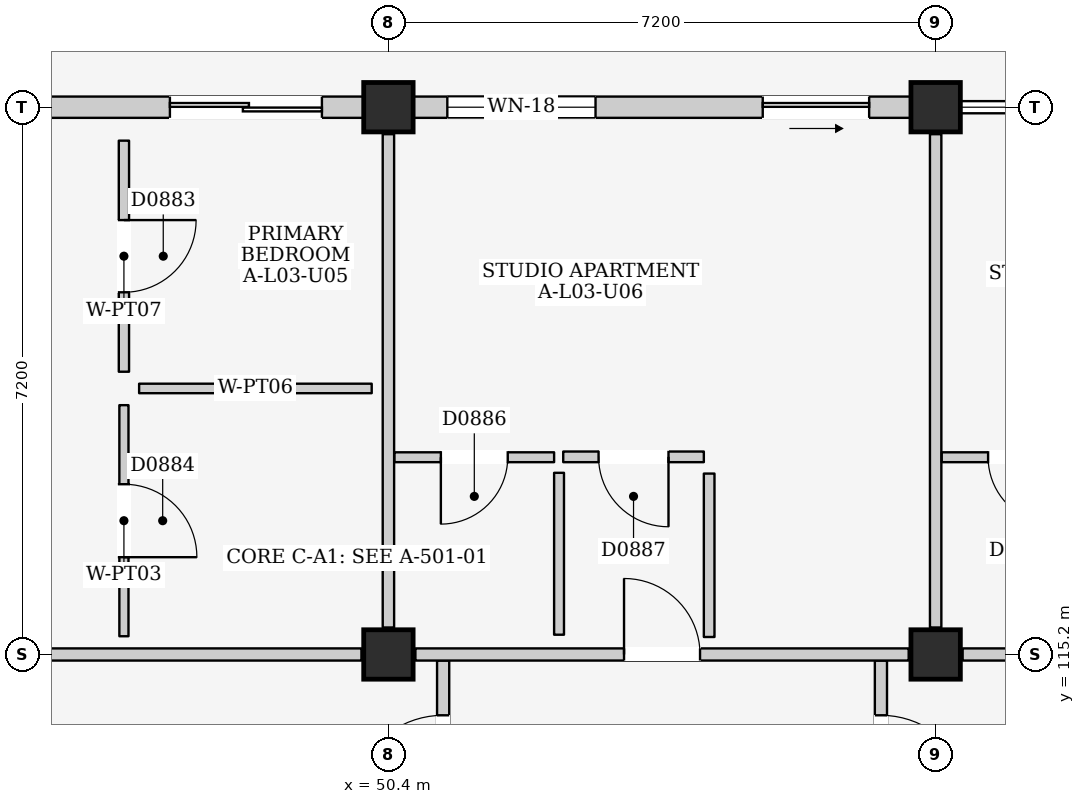
"""IFC4 building model, lengths in metres.
Left out: names, types, materials, properties, quantities, classifications, styles, units other than length and angle.
Written with IfcOpenShell. Run it as: python <this file> out.ifc"""

import sys

from ifc_helpers import new_model, si_unit, direction, frame, frame_2d, origin, origin_2d, place, context, subcontext, project, spatial, rectangle, extrude, element, fill, save


model = new_model("IFC4")
c1 = context("Model", 3, precision=1e-05, world=origin(), true_north=direction((0.0, 1.0)))
c2 = subcontext(c1, "Body", "Model", "MODEL_VIEW")
j1 = project(units=[si_unit("LENGTHUNIT", "METRE"), si_unit("PLANEANGLEUNIT", "RADIAN")], contexts=[c1])
p1 = place(None, origin())
s1 = spatial("IfcSite", under=j1, at=p1, CompositionType="ELEMENT")
p2 = place(p1, origin())
s2 = spatial("IfcBuilding", under=s1, at=p2, CompositionType="ELEMENT")
p3 = place(p2, frame((0.0, 0.0, 12.2)))
s3 = spatial("IfcBuildingStorey", under=s2, at=p3, CompositionType="ELEMENT", Elevation=12.2)
for number, where, z_axis, x_axis in (
    (1, (50.4, 115.2, 0.0), (0.0, 0.0, 1.0), (1.0, 0.0, 0.0)),
    (2, (50.4, 122.4, 0.0), (0.0, 0.0, 1.0), (1.0, 0.0, 0.0)),
    (3, (57.6, 115.2, 0.0), (0.0, 0.0, 1.0), (1.0, 0.0, 0.0)),
    (4, (57.6, 122.4, 0.0), (0.0, 0.0, 1.0), (1.0, 0.0, 0.0)),
):
    element("IfcColumn", number, at=place(p3, frame(where, z_axis=z_axis, x_axis=x_axis)), inside=s3, PredefinedType="COLUMN", context=c2, shape_type="SweptSolid", body=[
        extrude(rectangle(XDim=0.65, YDim=0.65, at=origin_2d()), origin(), (0.0, 0.0, 1.0), 3.2),
    ])
p4 = place(p3, frame((43.525, 122.4, 0.0), z_axis=(0.0, 0.0, 1.0), x_axis=(1.0, 0.0, 0.0)))
e5 = element("IfcWall", 5, at=p4, inside=s3, PredefinedType="ELEMENTEDWALL", context=c2, shape_type="SweptSolid", body=[
    extrude(rectangle(XDim=6.55, YDim=0.28, at=frame_2d((3.275, 0.0))), origin(), (0.0, 0.0, 1.0), 2.445),
])
p5 = place(p4, frame((4.0, 0.0, 0.0)))
e6 = element("IfcOpeningElement", 6, at=p5, cuts=e5, PredefinedType="OPENING", context=c2, shape_type="SweptSolid", body=[
    extrude(rectangle(XDim=2.0, YDim=2.12, at=frame_2d((1.0, 1.06))), frame((0.0, 0.155, 0.0), z_axis=(0.0, -1.0, 0.0), x_axis=(1.0, 0.0, 0.0)), (0.0, 0.0, 1.0), 0.31),
])
p6 = place(p4, frame((0.45, 0.0, 0.9)))
e7 = element("IfcOpeningElement", 7, at=p6, cuts=e5, PredefinedType="OPENING", context=c2, shape_type="SweptSolid", body=[
    extrude(rectangle(XDim=1.25, YDim=1.3, at=frame_2d((0.625, 0.65))), frame((0.0, 0.155, 0.0), z_axis=(0.0, -1.0, 0.0), x_axis=(1.0, 0.0, 0.0)), (0.0, 0.0, 1.0), 0.31),
])
p7 = place(p3, frame((50.725, 122.4, 0.0), z_axis=(0.0, 0.0, 1.0), x_axis=(1.0, 0.0, 0.0)))
e8 = element("IfcWall", 8, at=p7, inside=s3, PredefinedType="ELEMENTEDWALL", context=c2, shape_type="SweptSolid", body=[
    extrude(rectangle(XDim=6.55, YDim=0.28, at=frame_2d((3.275, 0.0))), origin(), (0.0, 0.0, 1.0), 2.445),
])
p8 = place(p7, frame((4.6, 0.0, 0.0)))
e9 = element("IfcOpeningElement", 9, at=p8, cuts=e8, PredefinedType="OPENING", context=c2, shape_type="SweptSolid", body=[
    extrude(rectangle(XDim=1.4, YDim=2.1, at=frame_2d((0.7, 1.05))), frame((0.0, 0.155, 0.0), z_axis=(0.0, -1.0, 0.0), x_axis=(1.0, 0.0, 0.0)), (0.0, 0.0, 1.0), 0.31),
])
p9 = place(p7, frame((0.45, 0.0, 0.785)))
e10 = element("IfcOpeningElement", 10, at=p9, cuts=e8, PredefinedType="OPENING", context=c2, shape_type="SweptSolid", body=[
    extrude(rectangle(XDim=1.95, YDim=1.55, at=frame_2d((0.975, 0.775))), frame((0.0, 0.155, 0.0), z_axis=(0.0, -1.0, 0.0), x_axis=(1.0, 0.0, 0.0)), (0.0, 0.0, 1.0), 0.31),
])
p10 = place(p3, frame((51.12, 111.1, 0.0), z_axis=(0.0, 0.0, 1.0), x_axis=(0.0, 1.0, 0.0)))
e11 = element("IfcWall", 11, at=p10, inside=s3, PredefinedType="PARTITIONING", context=c2, shape_type="SweptSolid", body=[
    extrude(rectangle(XDim=4.02, YDim=0.16, at=frame_2d((2.01, 0.0))), origin(), (0.0, 0.0, 1.0), 2.98),
])
p11 = place(p10, frame((2.1, 0.0, 0.0)))
e12 = element("IfcOpeningElement", 12, at=p11, cuts=e11, PredefinedType="OPENING", context=c2, shape_type="SweptSolid", body=[
    extrude(rectangle(XDim=1.2, YDim=2.2, at=frame_2d((0.6, 1.1))), frame((0.0, 0.095, 0.0), z_axis=(0.0, -1.0, 0.0), x_axis=(1.0, 0.0, 0.0)), (0.0, 0.0, 1.0), 0.19),
])
p12 = place(p3, frame((56.88, 111.1, 0.0), z_axis=(0.0, 0.0, 1.0), x_axis=(0.0, 1.0, 0.0)))
e13 = element("IfcWall", 13, at=p12, inside=s3, PredefinedType="PARTITIONING", context=c2, shape_type="SweptSolid", body=[
    extrude(rectangle(XDim=4.02, YDim=0.16, at=frame_2d((2.01, 0.0))), origin(), (0.0, 0.0, 1.0), 2.98),
])
p13 = place(p12, frame((2.1, 0.0, 0.0)))
e14 = element("IfcOpeningElement", 14, at=p13, cuts=e13, PredefinedType="OPENING", context=c2, shape_type="SweptSolid", body=[
    extrude(rectangle(XDim=1.2, YDim=2.2, at=frame_2d((0.6, 1.1))), frame((0.0, 0.095, 0.0), z_axis=(0.0, -1.0, 0.0), x_axis=(1.0, 0.0, 0.0)), (0.0, 0.0, 1.0), 0.19),
])
p14 = place(p3, frame((43.555, 115.2, 0.0), z_axis=(0.0, 0.0, 1.0), x_axis=(1.0, 0.0, 0.0)))
e15 = element("IfcWall", 15, at=p14, inside=s3, PredefinedType="PARTITIONING", context=c2, shape_type="SweptSolid", body=[
    extrude(rectangle(XDim=6.49, YDim=0.16, at=frame_2d((3.245, 0.0))), origin(), (0.0, 0.0, 1.0), 2.315),
])
p15 = place(p3, frame((50.4, 115.555, 0.0), z_axis=(0.0, 0.0, 1.0), x_axis=(0.0, 1.0, 0.0)))
e16 = element("IfcWall", 16, at=p15, inside=s3, PredefinedType="PARTITIONING", context=c2, shape_type="SweptSolid", body=[
    extrude(rectangle(XDim=6.49, YDim=0.15, at=frame_2d((3.245, 0.0))), origin(), (0.0, 0.0, 1.0), 2.415),
])
p16 = place(p3, frame((46.92, 118.92, 0.0), z_axis=(0.0, 0.0, 1.0), x_axis=(0.0, 1.0, 0.0)))
e17 = element("IfcWall", 17, at=p16, inside=s3, PredefinedType="PARTITIONING", context=c2, shape_type="SweptSolid", body=[
    extrude(rectangle(XDim=3.04, YDim=0.135, at=frame_2d((1.52, 0.0))), origin(), (0.0, 0.0, 1.0), 2.98),
])
p17 = place(p16, frame((1.045, 0.0, 0.0)))
e18 = element("IfcOpeningElement", 18, at=p17, cuts=e17, PredefinedType="OPENING", context=c2, shape_type="SweptSolid", body=[
    extrude(rectangle(XDim=0.95, YDim=2.15, at=frame_2d((0.475, 1.075))), frame((0.0, 0.083, 0.0), z_axis=(0.0, -1.0, 0.0), x_axis=(1.0, 0.0, 0.0)), (0.0, 0.0, 1.0), 0.165),
])
p18 = place(p3, frame((47.12, 118.7, 0.0), z_axis=(0.0, 0.0, 1.0), x_axis=(1.0, 0.0, 0.0)))
e19 = element("IfcWall", 19, at=p18, inside=s3, PredefinedType="PARTITIONING", context=c2, shape_type="SweptSolid", body=[
    extrude(rectangle(XDim=3.06, YDim=0.125, at=frame_2d((1.53, 0.0))), origin(), (0.0, 0.0, 1.0), 2.98),
])
p19 = place(p3, frame((46.92, 115.44, 0.0), z_axis=(0.0, 0.0, 1.0), x_axis=(0.0, 1.0, 0.0)))
e20 = element("IfcWall", 20, at=p19, inside=s3, PredefinedType="PARTITIONING", context=c2, shape_type="SweptSolid", body=[
    extrude(rectangle(XDim=3.04, YDim=0.12, at=frame_2d((1.52, 0.0))), origin(), (0.0, 0.0, 1.0), 2.98),
])
p20 = place(p19, frame((1.04, 0.0, 0.0)))
e21 = element("IfcOpeningElement", 21, at=p20, cuts=e20, PredefinedType="OPENING", context=c2, shape_type="SweptSolid", body=[
    extrude(rectangle(XDim=0.96, YDim=2.15, at=frame_2d((0.48, 1.075))), frame((0.0, 0.075, 0.0), z_axis=(0.0, -1.0, 0.0), x_axis=(1.0, 0.0, 0.0)), (0.0, 0.0, 1.0), 0.15),
])
p21 = place(p3, frame((50.755, 115.2, 0.0), z_axis=(0.0, 0.0, 1.0), x_axis=(1.0, 0.0, 0.0)))
e22 = element("IfcWall", 22, at=p21, inside=s3, PredefinedType="PARTITIONING", context=c2, shape_type="SweptSolid", body=[
    extrude(rectangle(XDim=6.49, YDim=0.16, at=frame_2d((3.245, 0.0))), origin(), (0.0, 0.0, 1.0), 2.315),
])
p22 = place(p21, frame((2.745, 0.0, 0.0)))
e23 = element("IfcOpeningElement", 23, at=p22, cuts=e22, PredefinedType="OPENING", context=c2, shape_type="SweptSolid", body=[
    extrude(rectangle(XDim=1.0, YDim=2.15, at=frame_2d((0.5, 1.075))), frame((0.0, 0.095, 0.0), z_axis=(0.0, -1.0, 0.0), x_axis=(1.0, 0.0, 0.0)), (0.0, 0.0, 1.0), 0.19),
])
p23 = place(p3, frame((57.6, 115.555, 0.0), z_axis=(0.0, 0.0, 1.0), x_axis=(0.0, 1.0, 0.0)))
e24 = element("IfcWall", 24, at=p23, inside=s3, PredefinedType="PARTITIONING", context=c2, shape_type="SweptSolid", body=[
    extrude(rectangle(XDim=6.49, YDim=0.15, at=frame_2d((3.245, 0.0))), origin(), (0.0, 0.0, 1.0), 2.415),
])
p24 = place(p3, frame((50.48, 117.795, 0.0), z_axis=(0.0, 0.0, 1.0), x_axis=(1.0, 0.0, 0.0)))
e25 = element("IfcWall", 25, at=p24, inside=s3, PredefinedType="PARTITIONING", context=c2, shape_type="SweptSolid", body=[
    extrude(rectangle(XDim=2.1, YDim=0.13, at=frame_2d((1.05, 0.0))), origin(), (0.0, 0.0, 1.0), 2.98),
])
p25 = place(p24, frame((0.61, 0.0, 0.0)))
e26 = element("IfcOpeningElement", 26, at=p25, cuts=e25, PredefinedType="OPENING", context=c2, shape_type="SweptSolid", body=[
    extrude(rectangle(XDim=0.88, YDim=2.1, at=frame_2d((0.44, 1.05))), frame((0.0, 0.08, 0.0), z_axis=(0.0, -1.0, 0.0), x_axis=(1.0, 0.0, 0.0)), (0.0, 0.0, 1.0), 0.16),
])
p26 = place(p3, frame((52.645, 115.46, 0.0), z_axis=(0.0, 0.0, 1.0), x_axis=(0.0, 1.0, 0.0)))
e27 = element("IfcWall", 27, at=p26, inside=s3, PredefinedType="PARTITIONING", context=c2, shape_type="SweptSolid", body=[
    extrude(rectangle(XDim=2.13, YDim=0.13, at=frame_2d((1.065, 0.0))), origin(), (0.0, 0.0, 1.0), 2.98),
])
p27 = place(p3, frame((52.7, 117.8, 0.0), z_axis=(0.0, 0.0, 1.0), x_axis=(1.0, 0.0, 0.0)))
e28 = element("IfcWall", 28, at=p27, inside=s3, PredefinedType="PARTITIONING", context=c2, shape_type="SweptSolid", body=[
    extrude(rectangle(XDim=1.85, YDim=0.14, at=frame_2d((0.925, 0.0))), origin(), (0.0, 0.0, 1.0), 2.98),
])
p28 = place(p27, frame((0.465, 0.0, 0.0)))
e29 = element("IfcOpeningElement", 29, at=p28, cuts=e28, PredefinedType="OPENING", context=c2, shape_type="SweptSolid", body=[
    extrude(rectangle(XDim=0.92, YDim=2.1, at=frame_2d((0.46, 1.05))), frame((0.0, 0.085, 0.0), z_axis=(0.0, -1.0, 0.0), x_axis=(1.0, 0.0, 0.0)), (0.0, 0.0, 1.0), 0.17),
])
p29 = place(p3, frame((54.62, 115.43, 0.0), z_axis=(0.0, 0.0, 1.0), x_axis=(0.0, 1.0, 0.0)))
e30 = element("IfcWall", 30, at=p29, inside=s3, PredefinedType="PARTITIONING", context=c2, shape_type="SweptSolid", body=[
    extrude(rectangle(XDim=2.15, YDim=0.14, at=frame_2d((1.075, 0.0))), origin(), (0.0, 0.0, 1.0), 2.98),
])
p30 = place(p3, frame((57.955, 115.2, 0.0), z_axis=(0.0, 0.0, 1.0), x_axis=(1.0, 0.0, 0.0)))
e31 = element("IfcWall", 31, at=p30, inside=s3, PredefinedType="PARTITIONING", context=c2, shape_type="SweptSolid", body=[
    extrude(rectangle(XDim=6.49, YDim=0.16, at=frame_2d((3.245, 0.0))), origin(), (0.0, 0.0, 1.0), 2.315),
])
p31 = place(p30, frame((2.745, 0.0, 0.0)))
e32 = element("IfcOpeningElement", 32, at=p31, cuts=e31, PredefinedType="OPENING", context=c2, shape_type="SweptSolid", body=[
    extrude(rectangle(XDim=1.0, YDim=2.15, at=frame_2d((0.5, 1.075))), frame((0.0, 0.095, 0.0), z_axis=(0.0, -1.0, 0.0), x_axis=(1.0, 0.0, 0.0)), (0.0, 0.0, 1.0), 0.19),
])
p32 = place(p3, frame((57.68, 117.795, 0.0), z_axis=(0.0, 0.0, 1.0), x_axis=(1.0, 0.0, 0.0)))
e33 = element("IfcWall", 33, at=p32, inside=s3, PredefinedType="PARTITIONING", context=c2, shape_type="SweptSolid", body=[
    extrude(rectangle(XDim=2.1, YDim=0.13, at=frame_2d((1.05, 0.0))), origin(), (0.0, 0.0, 1.0), 2.98),
])
p33 = place(p32, frame((0.61, 0.0, 0.0)))
e34 = element("IfcOpeningElement", 34, at=p33, cuts=e33, PredefinedType="OPENING", context=c2, shape_type="SweptSolid", body=[
    extrude(rectangle(XDim=0.88, YDim=2.1, at=frame_2d((0.44, 1.05))), frame((0.0, 0.08, 0.0), z_axis=(0.0, -1.0, 0.0), x_axis=(1.0, 0.0, 0.0)), (0.0, 0.0, 1.0), 0.16),
])
p34 = place(p5, frame((2.0, 0.0, 0.0), z_axis=(0.0, 0.0, 1.0), x_axis=(-1.0, 0.0, 0.0)))
e35 = element("IfcDoor", 35, at=p34, inside=s3, OperationType="DOUBLE_DOOR_SLIDING", PredefinedType="DOOR", context=c2, shape_type="SweptSolid", body=[
    extrude(rectangle(XDim=2.0, YDim=2.12, at=frame_2d((1.0, 1.06))), frame((0.0, 0.025, 0.0), z_axis=(0.0, -1.0, 0.0), x_axis=(1.0, 0.0, 0.0)), (0.0, 0.0, 1.0), 0.05),
])
fill(e6, e35)
p35 = place(p8, frame((1.4, 0.0, 0.0), z_axis=(0.0, 0.0, 1.0), x_axis=(-1.0, 0.0, 0.0)))
e36 = element("IfcDoor", 36, at=p35, inside=s3, OperationType="SLIDING_TO_RIGHT", PredefinedType="DOOR", context=c2, shape_type="SweptSolid", body=[
    extrude(rectangle(XDim=1.4, YDim=2.1, at=frame_2d((0.7, 1.05))), frame((0.0, 0.025, 0.0), z_axis=(0.0, -1.0, 0.0), x_axis=(1.0, 0.0, 0.0)), (0.0, 0.0, 1.0), 0.05),
])
fill(e9, e36)
p36 = place(p9, origin())
e37 = element("IfcWindow", 37, at=p36, inside=s3, PartitioningType="DOUBLE_PANEL_VERTICAL", PredefinedType="WINDOW", context=c2, shape_type="SweptSolid", body=[
    extrude(rectangle(XDim=1.95, YDim=1.55, at=frame_2d((0.975, 0.775))), frame((0.0, 0.03, 0.0), z_axis=(0.0, -1.0, 0.0), x_axis=(1.0, 0.0, 0.0)), (0.0, 0.0, 1.0), 0.06),
])
fill(e10, e37)
p37 = place(p11, origin())
e38 = element("IfcDoor", 38, at=p37, inside=s3, OperationType="SINGLE_SWING_LEFT", PredefinedType="DOOR", context=c2, shape_type="SweptSolid", body=[
    extrude(rectangle(XDim=1.2, YDim=2.2, at=frame_2d((0.6, 1.1))), frame((0.0, 0.025, 0.0), z_axis=(0.0, -1.0, 0.0), x_axis=(1.0, 0.0, 0.0)), (0.0, 0.0, 1.0), 0.05),
])
fill(e12, e38)
p38 = place(p13, frame((1.2, 0.0, 0.0), z_axis=(0.0, 0.0, 1.0), x_axis=(-1.0, 0.0, 0.0)))
e39 = element("IfcDoor", 39, at=p38, inside=s3, OperationType="SINGLE_SWING_RIGHT", PredefinedType="DOOR", context=c2, shape_type="SweptSolid", body=[
    extrude(rectangle(XDim=1.2, YDim=2.2, at=frame_2d((0.6, 1.1))), frame((0.0, 0.025, 0.0), z_axis=(0.0, -1.0, 0.0), x_axis=(1.0, 0.0, 0.0)), (0.0, 0.0, 1.0), 0.05),
])
fill(e14, e39)
p39 = place(p17, frame((0.95, 0.0, 0.0), z_axis=(0.0, 0.0, 1.0), x_axis=(-1.0, 0.0, 0.0)))
e40 = element("IfcDoor", 40, at=p39, inside=s3, OperationType="SINGLE_SWING_LEFT", PredefinedType="DOOR", context=c2, shape_type="SweptSolid", body=[
    extrude(rectangle(XDim=0.95, YDim=2.15, at=frame_2d((0.475, 1.075))), frame((0.0, 0.025, 0.0), z_axis=(0.0, -1.0, 0.0), x_axis=(1.0, 0.0, 0.0)), (0.0, 0.0, 1.0), 0.05),
])
fill(e18, e40)
p40 = place(p20, frame((0.96, 0.0, 0.0), z_axis=(0.0, 0.0, 1.0), x_axis=(-1.0, 0.0, 0.0)))
e41 = element("IfcDoor", 41, at=p40, inside=s3, OperationType="SINGLE_SWING_RIGHT", PredefinedType="DOOR", context=c2, shape_type="SweptSolid", body=[
    extrude(rectangle(XDim=0.96, YDim=2.15, at=frame_2d((0.48, 1.075))), frame((0.0, 0.025, 0.0), z_axis=(0.0, -1.0, 0.0), x_axis=(1.0, 0.0, 0.0)), (0.0, 0.0, 1.0), 0.05),
])
fill(e21, e41)
p41 = place(p22, origin())
e42 = element("IfcDoor", 42, at=p41, inside=s3, OperationType="SINGLE_SWING_LEFT", PredefinedType="DOOR", context=c2, shape_type="SweptSolid", body=[
    extrude(rectangle(XDim=1.0, YDim=2.15, at=frame_2d((0.5, 1.075))), frame((0.0, 0.025, 0.0), z_axis=(0.0, -1.0, 0.0), x_axis=(1.0, 0.0, 0.0)), (0.0, 0.0, 1.0), 0.05),
])
fill(e23, e42)
p42 = place(p25, frame((0.88, 0.0, 0.0), z_axis=(0.0, 0.0, 1.0), x_axis=(-1.0, 0.0, 0.0)))
e43 = element("IfcDoor", 43, at=p42, inside=s3, OperationType="SINGLE_SWING_RIGHT", PredefinedType="DOOR", context=c2, shape_type="SweptSolid", body=[
    extrude(rectangle(XDim=0.88, YDim=2.1, at=frame_2d((0.44, 1.05))), frame((0.0, 0.025, 0.0), z_axis=(0.0, -1.0, 0.0), x_axis=(1.0, 0.0, 0.0)), (0.0, 0.0, 1.0), 0.05),
])
fill(e26, e43)
p43 = place(p28, frame((0.92, 0.0, 0.0), z_axis=(0.0, 0.0, 1.0), x_axis=(-1.0, 0.0, 0.0)))
e44 = element("IfcDoor", 44, at=p43, inside=s3, OperationType="SINGLE_SWING_LEFT", PredefinedType="DOOR", context=c2, shape_type="SweptSolid", body=[
    extrude(rectangle(XDim=0.92, YDim=2.1, at=frame_2d((0.46, 1.05))), frame((0.0, 0.025, 0.0), z_axis=(0.0, -1.0, 0.0), x_axis=(1.0, 0.0, 0.0)), (0.0, 0.0, 1.0), 0.05),
])
fill(e29, e44)
p44 = place(p33, frame((0.88, 0.0, 0.0), z_axis=(0.0, 0.0, 1.0), x_axis=(-1.0, 0.0, 0.0)))
e45 = element("IfcDoor", 45, at=p44, inside=s3, OperationType="SINGLE_SWING_LEFT", PredefinedType="DOOR", context=c2, shape_type="SweptSolid", body=[
    extrude(rectangle(XDim=0.88, YDim=2.1, at=frame_2d((0.44, 1.05))), frame((0.0, 0.025, 0.0), z_axis=(0.0, -1.0, 0.0), x_axis=(1.0, 0.0, 0.0)), (0.0, 0.0, 1.0), 0.05),
])
fill(e34, e45)
save(model, sys.argv[1])
